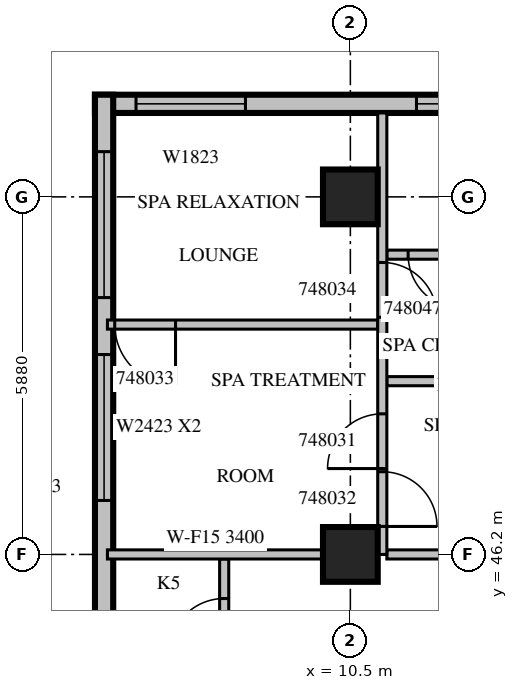
"""IFC4 building model, lengths in metres.
Left out: names, types, materials, properties, quantities, classifications, styles, units other than length and angle.
Written with IfcOpenShell. Run it as: python <this file> out.ifc"""

import sys

from ifc_helpers import new_model, si_unit, direction, frame, frame_2d, origin, origin_2d, place, context, subcontext, project, spatial, rectangle, extrude, source, transform, mapped, element, fill, save


model = new_model("IFC4")
c1 = context("Model", 3, precision=1e-05, world=origin(), true_north=direction((0.0, 1.0)))
c2 = subcontext(c1, "Body", "Model", "MODEL_VIEW")
j1 = project(units=[si_unit("LENGTHUNIT", "METRE"), si_unit("PLANEANGLEUNIT", "RADIAN")], contexts=[c1])
p1 = place(None, origin())
s1 = spatial("IfcSite", under=j1, at=p1, CompositionType="ELEMENT")
p2 = place(p1, origin())
s2 = spatial("IfcBuilding", under=s1, at=p2, CompositionType="ELEMENT")
p3 = place(p2, frame((0.0, 0.0, 215.8)))
s3 = spatial("IfcBuildingStorey", under=s2, at=p3, CompositionType="ELEMENT", Elevation=215.8)
m1 = source(origin(), c2, "Body", "SweptSolid", [
    extrude(rectangle(XDim=0.9, YDim=0.9, at=origin_2d()), origin(), (0.0, 0.0, 1.0), 3.8),
])
for number, where, z_axis, x_axis in (
    (1, (10.5, 46.2, 0.0), (0.0, 0.0, 1.0), (1.0, 0.0, 0.0)),
    (2, (10.5, 52.08, 0.0), (0.0, 0.0, 1.0), (1.0, 0.0, 0.0)),
):
    element("IfcColumn", number, at=place(p3, frame(where, z_axis=z_axis, x_axis=x_axis)), inside=s3, PredefinedType="COLUMN", context=c2, shape_type="MappedRepresentation", body=[
        mapped(m1, transform((0.0, 0.0, 0.0), scale=1.0)),
    ])
m2 = source(origin(), c2, "Body", "SweptSolid", [
    extrude(rectangle(XDim=10.5, YDim=0.3, at=frame_2d((5.25, 0.0))), origin(), (0.0, 0.0, 1.0), 3.4),
])
p4 = place(p3, frame((16.8, 53.61, 0.0), z_axis=(0.0, 0.0, 1.0), x_axis=(-1.0, 0.0, 0.0)))
e3 = element("IfcWall", 3, at=p4, inside=s3, PredefinedType="STANDARD", context=c2, shape_type="MappedRepresentation", body=[
    mapped(m2, transform((0.0, 0.0, 0.0), scale=1.0)),
])
m3 = source(origin(), c2, "Body", "SweptSolid", [
    extrude(rectangle(XDim=1.8, YDim=2.3, at=frame_2d((0.9, 1.15))), frame((0.0, 0.16, 0.0), z_axis=(0.0, -1.0, 0.0), x_axis=(1.0, 0.0, 0.0)), (0.0, 0.0, 1.0), 0.32),
])
p5 = place(p4, frame((8.025, 0.0, 0.6)))
e4 = element("IfcOpeningElement", 4, at=p5, cuts=e3, PredefinedType="OPENING", context=c2, shape_type="MappedRepresentation", body=[
    mapped(m3, transform((0.0, 0.0, 0.0), scale=1.0)),
])
m4 = source(origin(), c2, "Body", "SweptSolid", [
    extrude(rectangle(XDim=2.4, YDim=2.3, at=frame_2d((1.2, 1.15))), frame((0.0, 0.16, 0.0), z_axis=(0.0, -1.0, 0.0), x_axis=(1.0, 0.0, 0.0)), (0.0, 0.0, 1.0), 0.32),
])
p6 = place(p4, frame((2.812, 0.0, 0.6)))
e5 = element("IfcOpeningElement", 5, at=p6, cuts=e3, PredefinedType="OPENING", context=c2, shape_type="MappedRepresentation", body=[
    mapped(m4, transform((0.0, 0.0, 0.0), scale=1.0)),
])
m5 = source(origin(), c2, "Body", "SweptSolid", [
    extrude(rectangle(XDim=9.91, YDim=0.3, at=frame_2d((4.955, 0.0))), origin(), (0.0, 0.0, 1.0), 3.4),
])
p7 = place(p3, frame((6.45, 53.76, 0.0), z_axis=(0.0, 0.0, 1.0), x_axis=(0.0, -1.0, 0.0)))
e6 = element("IfcWall", 6, at=p7, inside=s3, PredefinedType="STANDARD", context=c2, shape_type="MappedRepresentation", body=[
    mapped(m5, transform((0.0, 0.0, 0.0), scale=1.0)),
])
p8 = place(p7, frame((4.272, 0.0, 0.6)))
e7 = element("IfcOpeningElement", 7, at=p8, cuts=e6, PredefinedType="OPENING", context=c2, shape_type="MappedRepresentation", body=[
    mapped(m4, transform((0.0, 0.0, 0.0), scale=1.0)),
])
p9 = place(p7, frame((0.936, 0.0, 0.6)))
e8 = element("IfcOpeningElement", 8, at=p9, cuts=e6, PredefinedType="OPENING", context=c2, shape_type="MappedRepresentation", body=[
    mapped(m4, transform((0.0, 0.0, 0.0), scale=1.0)),
])
m6 = source(origin(), c2, "Body", "SweptSolid", [
    extrude(rectangle(XDim=2.2, YDim=0.15, at=frame_2d((1.1, 0.0))), origin(), (0.0, 0.0, 1.0), 3.4),
])
p10 = place(p3, frame((8.425, 43.925, 0.0), z_axis=(0.0, 0.0, 1.0), x_axis=(0.0, 1.0, 0.0)))
e9 = element("IfcWall", 9, at=p10, inside=s3, PredefinedType="PARTITIONING", context=c2, shape_type="MappedRepresentation", body=[
    mapped(m6, transform((0.0, 0.0, 0.0), scale=1.0)),
])
m7 = source(origin(), c2, "Body", "SweptSolid", [
    extrude(rectangle(XDim=0.9, YDim=2.1, at=frame_2d((0.45, 1.05))), frame((0.0, 0.085, 0.0), z_axis=(0.0, -1.0, 0.0), x_axis=(1.0, 0.0, 0.0)), (0.0, 0.0, 1.0), 0.17),
])
p11 = place(p10, frame((0.65, 0.0, 0.0)))
e10 = element("IfcOpeningElement", 10, at=p11, cuts=e9, PredefinedType="OPENING", context=c2, shape_type="MappedRepresentation", body=[
    mapped(m7, transform((0.0, 0.0, 0.0), scale=1.0)),
])
m8 = source(origin(), c2, "Body", "SweptSolid", [
    extrude(rectangle(XDim=4.445, YDim=0.15, at=frame_2d((2.223, 0.0))), origin(), (0.0, 0.0, 1.0), 3.4),
])
p12 = place(p3, frame((10.95, 49.98, 0.0), z_axis=(0.0, 0.0, 1.0), x_axis=(-1.0, 0.0, 0.0)))
e11 = element("IfcWall", 11, at=p12, inside=s3, PredefinedType="PARTITIONING", context=c2, shape_type="MappedRepresentation", body=[
    mapped(m8, transform((0.0, 0.0, 0.0), scale=1.0)),
])
m9 = source(origin(), c2, "Body", "SweptSolid", [
    extrude(rectangle(XDim=1.0, YDim=2.1, at=frame_2d((0.5, 1.05))), frame((0.0, 0.085, 0.0), z_axis=(0.0, -1.0, 0.0), x_axis=(1.0, 0.0, 0.0)), (0.0, 0.0, 1.0), 0.17),
])
p13 = place(p12, frame((3.325, 0.0, 0.0)))
e12 = element("IfcOpeningElement", 12, at=p13, cuts=e11, PredefinedType="OPENING", context=c2, shape_type="MappedRepresentation", body=[
    mapped(m9, transform((0.0, 0.0, 0.0), scale=1.0)),
])
m10 = source(origin(), c2, "Body", "SweptSolid", [
    extrude(rectangle(XDim=3.6, YDim=0.15, at=frame_2d((1.8, 0.0))), origin(), (0.0, 0.0, 1.0), 3.4),
])
p14 = place(p3, frame((14.7, 49.049, 0.0), z_axis=(0.0, 0.0, 1.0), x_axis=(-1.0, 0.0, 0.0)))
e13 = element("IfcWall", 13, at=p14, inside=s3, PredefinedType="PARTITIONING", context=c2, shape_type="MappedRepresentation", body=[
    mapped(m10, transform((0.0, 0.0, 0.0), scale=1.0)),
])
p15 = place(p3, frame((14.7, 51.13, 0.0), z_axis=(0.0, 0.0, 1.0), x_axis=(-1.0, 0.0, 0.0)))
e14 = element("IfcWall", 14, at=p15, inside=s3, PredefinedType="PARTITIONING", context=c2, shape_type="MappedRepresentation", body=[
    mapped(m10, transform((0.0, 0.0, 0.0), scale=1.0)),
])
p16 = place(p15, frame((1.35, 0.0, 0.0)))
e15 = element("IfcOpeningElement", 15, at=p16, cuts=e14, PredefinedType="OPENING", context=c2, shape_type="MappedRepresentation", body=[
    mapped(m7, transform((0.0, 0.0, 0.0), scale=1.0)),
])
p17 = place(p15, frame((0.35, 0.0, 0.0)))
e16 = element("IfcOpeningElement", 16, at=p17, cuts=e14, PredefinedType="OPENING", context=c2, shape_type="MappedRepresentation", body=[
    mapped(m7, transform((0.0, 0.0, 0.0), scale=1.0)),
])
p18 = place(p15, frame((2.35, 0.0, 0.0)))
e17 = element("IfcOpeningElement", 17, at=p18, cuts=e14, PredefinedType="OPENING", context=c2, shape_type="MappedRepresentation", body=[
    mapped(m7, transform((0.0, 0.0, 0.0), scale=1.0)),
])
m11 = source(origin(), c2, "Body", "SweptSolid", [
    extrude(rectangle(XDim=3.546, YDim=0.15, at=frame_2d((1.773, 0.0))), origin(), (0.0, 0.0, 1.0), 3.4),
])
p19 = place(p3, frame((10.051, 46.2, 0.0), z_axis=(0.0, 0.0, 1.0), x_axis=(-1.0, 0.0, 0.0)))
e18 = element("IfcWall", 18, at=p19, inside=s3, PredefinedType="PARTITIONING", context=c2, shape_type="MappedRepresentation", body=[
    mapped(m11, transform((0.0, 0.0, 0.0), scale=1.0)),
])
p20 = place(p3, frame((14.7, 46.2, 0.0), z_axis=(0.0, 0.0, 1.0), x_axis=(-1.0, 0.0, 0.0)))
e19 = element("IfcWall", 19, at=p20, inside=s3, PredefinedType="PARTITIONING", context=c2, shape_type="MappedRepresentation", body=[
    mapped(m10, transform((0.0, 0.0, 0.0), scale=1.0)),
])
m12 = source(origin(), c2, "Body", "SweptSolid", [
    extrude(rectangle(XDim=7.26, YDim=0.15, at=frame_2d((3.63, 0.0))), origin(), (0.0, 0.0, 1.0), 3.4),
])
p21 = place(p3, frame((11.025, 46.2, 0.0), z_axis=(0.0, 0.0, 1.0), x_axis=(0.0, 1.0, 0.0)))
e20 = element("IfcWall", 20, at=p21, inside=s3, PredefinedType="PARTITIONING", context=c2, shape_type="MappedRepresentation", body=[
    mapped(m12, transform((0.0, 0.0, 0.0), scale=1.0)),
])
p22 = place(p21, frame((1.412, 0.0, 0.0)))
e21 = element("IfcOpeningElement", 21, at=p22, cuts=e20, PredefinedType="OPENING", context=c2, shape_type="MappedRepresentation", body=[
    mapped(m7, transform((0.0, 0.0, 0.0), scale=1.0)),
])
p23 = place(p21, frame((0.46, 0.0, 0.0)))
e22 = element("IfcOpeningElement", 22, at=p23, cuts=e20, PredefinedType="OPENING", context=c2, shape_type="MappedRepresentation", body=[
    mapped(m7, transform((0.0, 0.0, 0.0), scale=1.0)),
])
p24 = place(p21, frame((3.901, 0.0, 0.0)))
e23 = element("IfcOpeningElement", 23, at=p24, cuts=e20, PredefinedType="OPENING", context=c2, shape_type="MappedRepresentation", body=[
    mapped(m7, transform((0.0, 0.0, 0.0), scale=1.0)),
])
m13 = source(origin(), c2, "Body", "SweptSolid", [
    extrude(rectangle(XDim=1.8, YDim=2.3, at=frame_2d((0.9, 1.15))), frame((0.0, 0.03, 0.0), z_axis=(0.0, -1.0, 0.0), x_axis=(1.0, 0.0, 0.0)), (0.0, 0.0, 1.0), 0.06),
])
p25 = place(p5, origin())
e24 = element("IfcWindow", 24, at=p25, inside=s3, PartitioningType="SINGLE_PANEL", PredefinedType="WINDOW", context=c2, shape_type="MappedRepresentation", body=[
    mapped(m13, transform((0.0, 0.0, 0.0), scale=1.0)),
])
fill(e4, e24)
m14 = source(origin(), c2, "Body", "SweptSolid", [
    extrude(rectangle(XDim=2.4, YDim=2.3, at=frame_2d((1.2, 1.15))), frame((0.0, 0.03, 0.0), z_axis=(0.0, -1.0, 0.0), x_axis=(1.0, 0.0, 0.0)), (0.0, 0.0, 1.0), 0.06),
])
p26 = place(p6, origin())
e25 = element("IfcWindow", 25, at=p26, inside=s3, PartitioningType="SINGLE_PANEL", PredefinedType="WINDOW", context=c2, shape_type="MappedRepresentation", body=[
    mapped(m14, transform((0.0, 0.0, 0.0), scale=1.0)),
])
fill(e5, e25)
p27 = place(p8, origin())
e26 = element("IfcWindow", 26, at=p27, inside=s3, PartitioningType="SINGLE_PANEL", PredefinedType="WINDOW", context=c2, shape_type="MappedRepresentation", body=[
    mapped(m14, transform((0.0, 0.0, 0.0), scale=1.0)),
])
fill(e7, e26)
p28 = place(p9, origin())
e27 = element("IfcWindow", 27, at=p28, inside=s3, PartitioningType="SINGLE_PANEL", PredefinedType="WINDOW", context=c2, shape_type="MappedRepresentation", body=[
    mapped(m14, transform((0.0, 0.0, 0.0), scale=1.0)),
])
fill(e8, e27)
m15 = source(origin(), c2, "Body", "SweptSolid", [
    extrude(rectangle(XDim=0.9, YDim=2.1, at=frame_2d((0.45, 1.05))), frame((0.0, 0.025, 0.0), z_axis=(0.0, -1.0, 0.0), x_axis=(1.0, 0.0, 0.0)), (0.0, 0.0, 1.0), 0.05),
])
p29 = place(p11, origin())
e28 = element("IfcDoor", 28, at=p29, inside=s3, OperationType="SINGLE_SWING_LEFT", PredefinedType="DOOR", context=c2, shape_type="MappedRepresentation", body=[
    mapped(m15, transform((0.0, 0.0, 0.0), scale=1.0)),
])
fill(e10, e28)
p30 = place(p22, origin())
e29 = element("IfcDoor", 29, at=p30, inside=s3, OperationType="SINGLE_SWING_LEFT", PredefinedType="DOOR", context=c2, shape_type="MappedRepresentation", body=[
    mapped(m15, transform((0.0, 0.0, 0.0), scale=1.0)),
])
fill(e21, e29)
p31 = place(p23, origin())
e30 = element("IfcDoor", 30, at=p31, inside=s3, OperationType="SINGLE_SWING_RIGHT", PredefinedType="DOOR", context=c2, shape_type="MappedRepresentation", body=[
    mapped(m15, transform((0.0, 0.0, 0.0), scale=1.0)),
])
fill(e22, e30)
m16 = source(origin(), c2, "Body", "SweptSolid", [
    extrude(rectangle(XDim=1.0, YDim=2.1, at=frame_2d((0.5, 1.05))), frame((0.0, 0.025, 0.0), z_axis=(0.0, -1.0, 0.0), x_axis=(1.0, 0.0, 0.0)), (0.0, 0.0, 1.0), 0.05),
])
p32 = place(p13, origin())
e31 = element("IfcDoor", 31, at=p32, inside=s3, OperationType="SINGLE_SWING_LEFT", PredefinedType="DOOR", context=c2, shape_type="MappedRepresentation", body=[
    mapped(m16, transform((0.0, 0.0, 0.0), scale=1.0)),
])
fill(e12, e31)
p33 = place(p24, origin())
e32 = element("IfcDoor", 32, at=p33, inside=s3, OperationType="SINGLE_SWING_RIGHT", PredefinedType="DOOR", context=c2, shape_type="MappedRepresentation", body=[
    mapped(m15, transform((0.0, 0.0, 0.0), scale=1.0)),
])
fill(e23, e32)
p34 = place(p18, origin())
e33 = element("IfcDoor", 33, at=p34, inside=s3, OperationType="SINGLE_SWING_LEFT", PredefinedType="DOOR", context=c2, shape_type="MappedRepresentation", body=[
    mapped(m15, transform((0.0, 0.0, 0.0), scale=1.0)),
])
fill(e17, e33)
save(model, sys.argv[1])
